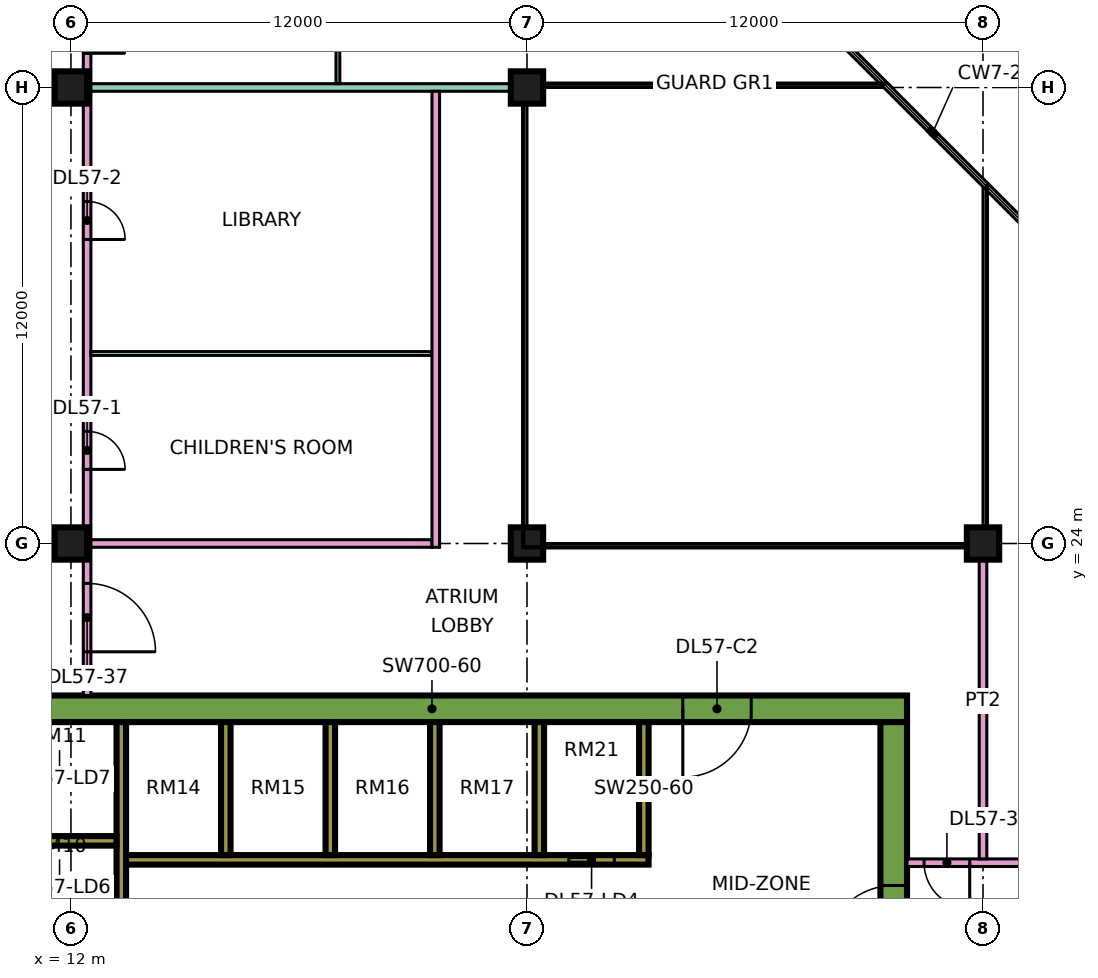
"""IFC4 building model, lengths in metres.
Left out: names, types, materials, properties, quantities, classifications, styles, units other than length and angle.
Written with IfcOpenShell. Run it as: python <this file> out.ifc"""

import sys

from ifc_helpers import new_model, si_unit, direction, frame, frame_2d, origin, origin_2d, place, context, subcontext, project, spatial, rectangle, extrude, element, fill, save


model = new_model("IFC4")
c1 = context("Model", 3, precision=1e-05, world=origin(), true_north=direction((0.0, 1.0)))
c2 = subcontext(c1, "Body", "Model", "MODEL_VIEW")
j1 = project(units=[si_unit("LENGTHUNIT", "METRE"), si_unit("PLANEANGLEUNIT", "RADIAN")], contexts=[c1])
p1 = place(None, origin())
s1 = spatial("IfcSite", under=j1, at=p1, CompositionType="ELEMENT")
p2 = place(p1, origin())
s2 = spatial("IfcBuilding", under=s1, at=p2, CompositionType="ELEMENT")
p3 = place(p2, frame((0.0, 0.0, 241.65)))
s3 = spatial("IfcBuildingStorey", under=s2, at=p3, CompositionType="ELEMENT", Elevation=241.65)
for number, where, z_axis, x_axis in (
    (1, (12.0, 24.0, 0.0), (0.0, 0.0, 1.0), (1.0, 0.0, 0.0)),
    (2, (12.0, 36.0, 0.0), (0.0, 0.0, 1.0), (1.0, 0.0, 0.0)),
    (3, (24.0, 24.0, 0.0), (0.0, 0.0, 1.0), (1.0, 0.0, 0.0)),
    (4, (24.0, 36.0, 0.0), (0.0, 0.0, 1.0), (1.0, 0.0, 0.0)),
    (5, (36.0, 24.0, 0.0), (0.0, 0.0, 1.0), (1.0, 0.0, 0.0)),
):
    element("IfcColumn", number, at=place(p3, frame(where, z_axis=z_axis, x_axis=x_axis)), inside=s3, PredefinedType="COLUMN", context=c2, shape_type="SweptSolid", body=[
        extrude(rectangle(XDim=0.85, YDim=0.85, at=origin_2d()), origin(), (0.0, 0.0, 1.0), 3.75),
    ])
p4 = place(p3, frame((9.0, 19.65, 0.0), z_axis=(0.0, 0.0, 1.0), x_axis=(1.0, 0.0, 0.0)))
e6 = element("IfcWall", 6, at=p4, inside=s3, PredefinedType="SHEAR", context=c2, shape_type="SweptSolid", body=[
    extrude(rectangle(XDim=25.0, YDim=0.7, at=frame_2d((12.5, 0.0))), origin(), (0.0, 0.0, 1.0), 3.75),
])
p5 = place(p4, frame((19.1, 0.0, 0.0)))
e7 = element("IfcOpeningElement", 7, at=p5, cuts=e6, PredefinedType="OPENING", context=c2, shape_type="SweptSolid", body=[
    extrude(rectangle(XDim=1.8, YDim=2.4, at=frame_2d((0.9, 1.2))), frame((0.0, 0.36, 0.0), z_axis=(0.0, -1.0, 0.0), x_axis=(1.0, 0.0, 0.0)), (0.0, 0.0, 1.0), 0.72),
])
p6 = place(p3, frame((33.65, 7.7, 0.0), z_axis=(0.0, 0.0, 1.0), x_axis=(0.0, 1.0, 0.0)))
e8 = element("IfcWall", 8, at=p6, inside=s3, PredefinedType="SHEAR", context=c2, shape_type="SweptSolid", body=[
    extrude(rectangle(XDim=11.6, YDim=0.7, at=frame_2d((5.8, 0.0))), origin(), (0.0, 0.0, 1.0), 3.75),
])
p7 = place(p6, frame((5.5, 0.0, 0.0)))
e9 = element("IfcOpeningElement", 9, at=p7, cuts=e8, PredefinedType="OPENING", context=c2, shape_type="SweptSolid", body=[
    extrude(rectangle(XDim=1.8, YDim=2.4, at=frame_2d((0.9, 1.2))), frame((0.0, 0.36, 0.0), z_axis=(0.0, -1.0, 0.0), x_axis=(1.0, 0.0, 0.0)), (0.0, 0.0, 1.0), 0.72),
])
p8 = place(p3, frame((13.325, 7.7, 0.0), z_axis=(0.0, 0.0, 1.0), x_axis=(0.0, 1.0, 0.0)))
e10 = element("IfcWall", 10, at=p8, inside=s3, PredefinedType="SHEAR", context=c2, shape_type="SweptSolid", body=[
    extrude(rectangle(XDim=11.6, YDim=0.25, at=frame_2d((5.8, 0.0))), origin(), (0.0, 0.0, 1.0), 3.75),
])
p9 = place(p3, frame((13.45, 15.675, 0.0), z_axis=(0.0, 0.0, 1.0), x_axis=(1.0, 0.0, 0.0)))
e11 = element("IfcWall", 11, at=p9, inside=s3, PredefinedType="SHEAR", context=c2, shape_type="SweptSolid", body=[
    extrude(rectangle(XDim=13.75, YDim=0.25, at=frame_2d((6.875, 0.0))), origin(), (0.0, 0.0, 1.0), 3.75),
])
p10 = place(p9, frame((11.65, 0.0, 0.0)))
e12 = element("IfcOpeningElement", 12, at=p10, cuts=e11, PredefinedType="OPENING", context=c2, shape_type="SweptSolid", body=[
    extrude(rectangle(XDim=1.2, YDim=2.2, at=frame_2d((0.6, 1.1))), frame((0.0, 0.135, 0.0), z_axis=(0.0, -1.0, 0.0), x_axis=(1.0, 0.0, 0.0)), (0.0, 0.0, 1.0), 0.27),
])
p11 = place(p3, frame((10.2, 16.175, 0.0), z_axis=(0.0, 0.0, 1.0), x_axis=(1.0, 0.0, 0.0)))
e13 = element("IfcWall", 13, at=p11, inside=s3, PredefinedType="SHEAR", context=c2, shape_type="SweptSolid", body=[
    extrude(rectangle(XDim=3.0, YDim=0.25, at=frame_2d((1.5, 0.0))), origin(), (0.0, 0.0, 1.0), 3.75),
])
for number, where, z_axis, x_axis in (
    (14, (16.075, 15.8, 0.0), (0.0, 0.0, 1.0), (0.0, 1.0, 0.0)),
    (15, (18.825, 15.8, 0.0), (0.0, 0.0, 1.0), (0.0, 1.0, 0.0)),
    (16, (21.575, 15.8, 0.0), (0.0, 0.0, 1.0), (0.0, 1.0, 0.0)),
    (17, (24.325, 15.8, 0.0), (0.0, 0.0, 1.0), (0.0, 1.0, 0.0)),
    (18, (27.075, 15.8, 0.0), (0.0, 0.0, 1.0), (0.0, 1.0, 0.0)),
):
    element("IfcWall", number, at=place(p3, frame(where, z_axis=z_axis, x_axis=x_axis)), inside=s3, PredefinedType="SHEAR", context=c2, shape_type="SweptSolid", body=[
        extrude(rectangle(XDim=3.5, YDim=0.25, at=frame_2d((1.75, 0.0))), origin(), (0.0, 0.0, 1.0), 3.75),
    ])
p12 = place(p3, frame((12.425, 20.0, 0.0), z_axis=(0.0, 0.0, 1.0), x_axis=(0.0, 1.0, 0.0)))
e19 = element("IfcWall", 19, at=p12, inside=s3, PredefinedType="PARTITIONING", context=c2, shape_type="SweptSolid", body=[
    extrude(rectangle(XDim=43.0, YDim=0.2, at=frame_2d((21.5, 0.0))), origin(), (0.0, 0.0, 1.0), 3.35),
])
p13 = place(p12, frame((5.95, 0.0, 0.0)))
e20 = element("IfcOpeningElement", 20, at=p13, cuts=e19, PredefinedType="OPENING", context=c2, shape_type="SweptSolid", body=[
    extrude(rectangle(XDim=1.0, YDim=2.1, at=frame_2d((0.5, 1.05))), frame((0.0, 0.11, 0.0), z_axis=(0.0, -1.0, 0.0), x_axis=(1.0, 0.0, 0.0)), (0.0, 0.0, 1.0), 0.22),
])
p14 = place(p12, frame((12.0, 0.0, 0.0)))
e21 = element("IfcOpeningElement", 21, at=p14, cuts=e19, PredefinedType="OPENING", context=c2, shape_type="SweptSolid", body=[
    extrude(rectangle(XDim=1.0, YDim=2.1, at=frame_2d((0.5, 1.05))), frame((0.0, 0.11, 0.0), z_axis=(0.0, -1.0, 0.0), x_axis=(1.0, 0.0, 0.0)), (0.0, 0.0, 1.0), 0.22),
])
p15 = place(p12, frame((16.9, 0.0, 0.0)))
e22 = element("IfcOpeningElement", 22, at=p15, cuts=e19, PredefinedType="OPENING", context=c2, shape_type="SweptSolid", body=[
    extrude(rectangle(XDim=1.0, YDim=2.1, at=frame_2d((0.5, 1.05))), frame((0.0, 0.11, 0.0), z_axis=(0.0, -1.0, 0.0), x_axis=(1.0, 0.0, 0.0)), (0.0, 0.0, 1.0), 0.22),
])
p16 = place(p12, frame((41.05, 0.0, 0.0)))
e23 = element("IfcOpeningElement", 23, at=p16, cuts=e19, PredefinedType="OPENING", context=c2, shape_type="SweptSolid", body=[
    extrude(rectangle(XDim=1.0, YDim=2.1, at=frame_2d((0.5, 1.05))), frame((0.0, 0.11, 0.0), z_axis=(0.0, -1.0, 0.0), x_axis=(1.0, 0.0, 0.0)), (0.0, 0.0, 1.0), 0.22),
])
p17 = place(p12, frame((1.15, 0.0, 0.0)))
e24 = element("IfcOpeningElement", 24, at=p17, cuts=e19, PredefinedType="OPENING", context=c2, shape_type="SweptSolid", body=[
    extrude(rectangle(XDim=1.8, YDim=2.1, at=frame_2d((0.9, 1.05))), frame((0.0, 0.11, 0.0), z_axis=(0.0, -1.0, 0.0), x_axis=(1.0, 0.0, 0.0)), (0.0, 0.0, 1.0), 0.22),
])
p18 = place(p12, frame((28.6, 0.0, 0.0)))
e25 = element("IfcOpeningElement", 25, at=p18, cuts=e19, PredefinedType="OPENING", context=c2, shape_type="SweptSolid", body=[
    extrude(rectangle(XDim=1.8, YDim=2.1, at=frame_2d((0.9, 1.05))), frame((0.0, 0.11, 0.0), z_axis=(0.0, -1.0, 0.0), x_axis=(1.0, 0.0, 0.0)), (0.0, 0.0, 1.0), 0.22),
])
p19 = place(p3, frame((12.525, 24.0, 0.0), z_axis=(0.0, 0.0, 1.0), x_axis=(1.0, 0.0, 0.0)))
e26 = element("IfcWall", 26, at=p19, inside=s3, PredefinedType="PARTITIONING", context=c2, shape_type="SweptSolid", body=[
    extrude(rectangle(XDim=8.975, YDim=0.2, at=frame_2d((4.488, 0.0))), origin(), (0.0, 0.0, 1.0), 3.35),
])
p20 = place(p3, frame((12.525, 29.0, 0.0), z_axis=(0.0, 0.0, 1.0), x_axis=(1.0, 0.0, 0.0)))
e27 = element("IfcWall", 27, at=p20, inside=s3, PredefinedType="PARTITIONING", context=c2, shape_type="SweptSolid", body=[
    extrude(rectangle(XDim=8.975, YDim=0.1, at=frame_2d((4.488, 0.0))), origin(), (0.0, 0.0, 1.0), 3.35),
])
p21 = place(p3, frame((12.525, 36.0, 0.0), z_axis=(0.0, 0.0, 1.0), x_axis=(1.0, 0.0, 0.0)))
e28 = element("IfcWall", 28, at=p21, inside=s3, PredefinedType="PARTITIONING", context=c2, shape_type="SweptSolid", body=[
    extrude(rectangle(XDim=11.475, YDim=0.2, at=frame_2d((5.738, 0.0))), origin(), (0.0, 0.0, 1.0), 3.35),
])
p22 = place(p3, frame((19.025, 36.1, 0.0), z_axis=(0.0, 0.0, 1.0), x_axis=(0.0, 1.0, 0.0)))
e29 = element("IfcWall", 29, at=p22, inside=s3, PredefinedType="PARTITIONING", context=c2, shape_type="SweptSolid", body=[
    extrude(rectangle(XDim=5.95, YDim=0.1, at=frame_2d((2.975, 0.0))), origin(), (0.0, 0.0, 1.0), 3.35),
])
p23 = place(p22, frame((0.95, 0.0, 0.0)))
e30 = element("IfcOpeningElement", 30, at=p23, cuts=e29, PredefinedType="OPENING", context=c2, shape_type="SweptSolid", body=[
    extrude(rectangle(XDim=0.9, YDim=2.1, at=frame_2d((0.45, 1.05))), frame((0.0, 0.06, 0.0), z_axis=(0.0, -1.0, 0.0), x_axis=(1.0, 0.0, 0.0)), (0.0, 0.0, 1.0), 0.12),
])
p24 = place(p22, frame((3.95, 0.0, 0.0)))
e31 = element("IfcOpeningElement", 31, at=p24, cuts=e29, PredefinedType="OPENING", context=c2, shape_type="SweptSolid", body=[
    extrude(rectangle(XDim=0.9, YDim=2.1, at=frame_2d((0.45, 1.05))), frame((0.0, 0.06, 0.0), z_axis=(0.0, -1.0, 0.0), x_axis=(1.0, 0.0, 0.0)), (0.0, 0.0, 1.0), 0.12),
])
p25 = place(p3, frame((21.6, 23.9, 0.0), z_axis=(0.0, 0.0, 1.0), x_axis=(0.0, 1.0, 0.0)))
e32 = element("IfcWall", 32, at=p25, inside=s3, PredefinedType="PARTITIONING", context=c2, shape_type="SweptSolid", body=[
    extrude(rectangle(XDim=12.0, YDim=0.2, at=frame_2d((6.0, 0.0))), origin(), (0.0, 0.0, 1.0), 3.35),
])
p26 = place(p3, frame((34.0, 15.6, 0.0), z_axis=(0.0, 0.0, 1.0), x_axis=(1.0, 0.0, 0.0)))
e33 = element("IfcWall", 33, at=p26, inside=s3, PredefinedType="PARTITIONING", context=c2, shape_type="SweptSolid", body=[
    extrude(rectangle(XDim=10.35, YDim=0.2, at=frame_2d((5.175, 0.0))), origin(), (0.0, 0.0, 1.0), 3.35),
])
p27 = place(p26, frame((5.6, 0.0, 0.0)))
e34 = element("IfcOpeningElement", 34, at=p27, cuts=e33, PredefinedType="OPENING", context=c2, shape_type="SweptSolid", body=[
    extrude(rectangle(XDim=1.0, YDim=2.1, at=frame_2d((0.5, 1.05))), frame((0.0, 0.11, 0.0), z_axis=(0.0, -1.0, 0.0), x_axis=(1.0, 0.0, 0.0)), (0.0, 0.0, 1.0), 0.22),
])
p28 = place(p26, frame((0.45, 0.0, 0.0)))
e35 = element("IfcOpeningElement", 35, at=p28, cuts=e33, PredefinedType="OPENING", context=c2, shape_type="SweptSolid", body=[
    extrude(rectangle(XDim=1.2, YDim=2.1, at=frame_2d((0.6, 1.05))), frame((0.0, 0.11, 0.0), z_axis=(0.0, -1.0, 0.0), x_axis=(1.0, 0.0, 0.0)), (0.0, 0.0, 1.0), 0.22),
])
p29 = place(p3, frame((36.0, 15.7, 0.0), z_axis=(0.0, 0.0, 1.0), x_axis=(0.0, 1.0, 0.0)))
e36 = element("IfcWall", 36, at=p29, inside=s3, PredefinedType="PARTITIONING", context=c2, shape_type="SweptSolid", body=[
    extrude(rectangle(XDim=8.3, YDim=0.2, at=frame_2d((4.15, 0.0))), origin(), (0.0, 0.0, 1.0), 3.35),
])
p30 = place(p10, origin())
e37 = element("IfcDoor", 37, at=p30, inside=s3, OperationType="DOUBLE_DOOR_SLIDING", PredefinedType="DOOR", context=c2, shape_type="SweptSolid", body=[
    extrude(rectangle(XDim=1.2, YDim=2.2, at=frame_2d((0.6, 1.1))), frame((0.0, 0.025, 0.0), z_axis=(0.0, -1.0, 0.0), x_axis=(1.0, 0.0, 0.0)), (0.0, 0.0, 1.0), 0.05),
])
fill(e12, e37)
p31 = place(p7, origin())
e38 = element("IfcDoor", 38, at=p31, inside=s3, OperationType="DOUBLE_DOOR_SINGLE_SWING", PredefinedType="DOOR", context=c2, shape_type="SweptSolid", body=[
    extrude(rectangle(XDim=1.8, YDim=2.4, at=frame_2d((0.9, 1.2))), frame((0.0, 0.025, 0.0), z_axis=(0.0, -1.0, 0.0), x_axis=(1.0, 0.0, 0.0)), (0.0, 0.0, 1.0), 0.05),
])
fill(e9, e38)
p32 = place(p5, frame((1.8, 0.0, 0.0), z_axis=(0.0, 0.0, 1.0), x_axis=(-1.0, 0.0, 0.0)))
e39 = element("IfcDoor", 39, at=p32, inside=s3, OperationType="DOUBLE_DOOR_SINGLE_SWING", PredefinedType="DOOR", context=c2, shape_type="SweptSolid", body=[
    extrude(rectangle(XDim=1.8, YDim=2.4, at=frame_2d((0.9, 1.2))), frame((0.0, 0.025, 0.0), z_axis=(0.0, -1.0, 0.0), x_axis=(1.0, 0.0, 0.0)), (0.0, 0.0, 1.0), 0.05),
])
fill(e7, e39)
p33 = place(p13, frame((1.0, 0.0, 0.0), z_axis=(0.0, 0.0, 1.0), x_axis=(-1.0, 0.0, 0.0)))
e40 = element("IfcDoor", 40, at=p33, inside=s3, OperationType="SINGLE_SWING_LEFT", PredefinedType="DOOR", context=c2, shape_type="SweptSolid", body=[
    extrude(rectangle(XDim=1.0, YDim=2.1, at=frame_2d((0.5, 1.05))), frame((0.0, 0.025, 0.0), z_axis=(0.0, -1.0, 0.0), x_axis=(1.0, 0.0, 0.0)), (0.0, 0.0, 1.0), 0.05),
])
fill(e20, e40)
p34 = place(p14, frame((1.0, 0.0, 0.0), z_axis=(0.0, 0.0, 1.0), x_axis=(-1.0, 0.0, 0.0)))
e41 = element("IfcDoor", 41, at=p34, inside=s3, OperationType="SINGLE_SWING_LEFT", PredefinedType="DOOR", context=c2, shape_type="SweptSolid", body=[
    extrude(rectangle(XDim=1.0, YDim=2.1, at=frame_2d((0.5, 1.05))), frame((0.0, 0.025, 0.0), z_axis=(0.0, -1.0, 0.0), x_axis=(1.0, 0.0, 0.0)), (0.0, 0.0, 1.0), 0.05),
])
fill(e21, e41)
p35 = place(p15, frame((1.0, 0.0, 0.0), z_axis=(0.0, 0.0, 1.0), x_axis=(-1.0, 0.0, 0.0)))
e42 = element("IfcDoor", 42, at=p35, inside=s3, OperationType="SINGLE_SWING_LEFT", PredefinedType="DOOR", context=c2, shape_type="SweptSolid", body=[
    extrude(rectangle(XDim=1.0, YDim=2.1, at=frame_2d((0.5, 1.05))), frame((0.0, 0.025, 0.0), z_axis=(0.0, -1.0, 0.0), x_axis=(1.0, 0.0, 0.0)), (0.0, 0.0, 1.0), 0.05),
])
fill(e22, e42)
p36 = place(p28, origin())
e43 = element("IfcDoor", 43, at=p36, inside=s3, OperationType="SINGLE_SWING_RIGHT", PredefinedType="DOOR", context=c2, shape_type="SweptSolid", body=[
    extrude(rectangle(XDim=1.2, YDim=2.1, at=frame_2d((0.6, 1.05))), frame((0.0, 0.025, 0.0), z_axis=(0.0, -1.0, 0.0), x_axis=(1.0, 0.0, 0.0)), (0.0, 0.0, 1.0), 0.05),
])
fill(e35, e43)
p37 = place(p17, frame((1.8, 0.0, 0.0), z_axis=(0.0, 0.0, 1.0), x_axis=(-1.0, 0.0, 0.0)))
e44 = element("IfcDoor", 44, at=p37, inside=s3, OperationType="DOUBLE_DOOR_SINGLE_SWING", PredefinedType="DOOR", context=c2, shape_type="SweptSolid", body=[
    extrude(rectangle(XDim=1.8, YDim=2.1, at=frame_2d((0.9, 1.05))), frame((0.0, 0.025, 0.0), z_axis=(0.0, -1.0, 0.0), x_axis=(1.0, 0.0, 0.0)), (0.0, 0.0, 1.0), 0.05),
])
fill(e24, e44)
save(model, sys.argv[1])
